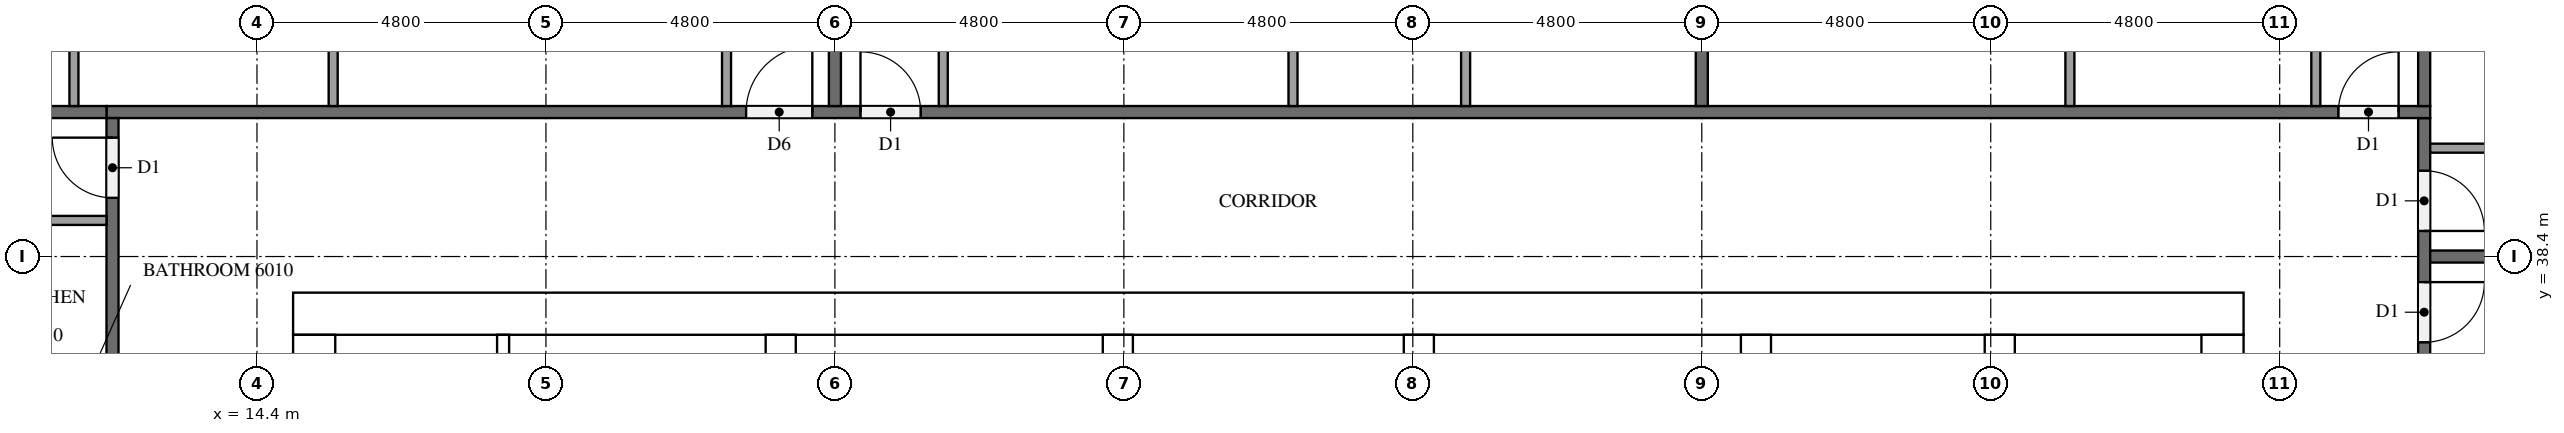
"""IFC4 building model, lengths in metres.
Left out: names, types, materials, properties, quantities, classifications, styles, units other than length and angle.
Written with IfcOpenShell. Run it as: python <this file> out.ifc"""

import sys

from ifc_helpers import new_model, si_unit, direction, frame, frame_2d, origin, place, context, subcontext, project, spatial, rectangle, extrude, element, fill, save


model = new_model("IFC4")
c1 = context("Model", 3, precision=1e-05, world=origin(), true_north=direction((0.0, 1.0)))
c2 = subcontext(c1, "Body", "Model", "MODEL_VIEW")
j1 = project(units=[si_unit("LENGTHUNIT", "METRE"), si_unit("PLANEANGLEUNIT", "RADIAN")], contexts=[c1])
p1 = place(None, origin())
s1 = spatial("IfcSite", under=j1, at=p1, CompositionType="ELEMENT")
p2 = place(p1, origin())
s2 = spatial("IfcBuilding", under=s1, at=p2, CompositionType="ELEMENT")
p3 = place(p2, frame((0.0, 0.0, 229.8)))
s3 = spatial("IfcBuildingStorey", under=s2, at=p3, CompositionType="ELEMENT", Elevation=229.8)
p4 = place(p3, frame((15.0, 37.45, 0.0), z_axis=(0.0, 0.0, 1.0), x_axis=(1.0, 0.0, 0.0)))
e1 = element("IfcWall", 1, at=p4, inside=s3, PredefinedType="SHEAR", context=c2, shape_type="SweptSolid", body=[
    extrude(rectangle(XDim=32.4, YDim=0.7, at=frame_2d((16.2, 0.0))), origin(), (0.0, 0.0, 1.0), 3.1),
])
p5 = place(p4, frame((15.3, 0.0, 0.0)))
e2 = element("IfcOpeningElement", 2, at=p5, cuts=e1, PredefinedType="OPENING", context=c2, shape_type="SweptSolid", body=[
    extrude(rectangle(XDim=1.8, YDim=2.1, at=frame_2d((0.9, 1.05))), frame((0.0, 0.36, 0.0), z_axis=(0.0, -1.0, 0.0), x_axis=(1.0, 0.0, 0.0)), (0.0, 0.0, 1.0), 0.72),
])
p6 = place(p4, frame((1.544, 0.0, 0.0)))
e3 = element("IfcOpeningElement", 3, at=p6, cuts=e1, PredefinedType="OPENING", context=c2, shape_type="SweptSolid", body=[
    extrude(rectangle(XDim=1.0, YDim=2.1, at=frame_2d((0.5, 1.05))), frame((0.0, 0.36, 0.0), z_axis=(0.0, -1.0, 0.0), x_axis=(1.0, 0.0, 0.0)), (0.0, 0.0, 1.0), 0.72),
])
p7 = place(p4, frame((5.219, 0.0, 0.0)))
e4 = element("IfcOpeningElement", 4, at=p7, cuts=e1, PredefinedType="OPENING", context=c2, shape_type="SweptSolid", body=[
    extrude(rectangle(XDim=1.0, YDim=2.1, at=frame_2d((0.5, 1.05))), frame((0.0, 0.36, 0.0), z_axis=(0.0, -1.0, 0.0), x_axis=(1.0, 0.0, 0.0)), (0.0, 0.0, 1.0), 0.72),
])
p8 = place(p3, frame((15.35, 15.7, 0.0), z_axis=(0.0, 0.0, 1.0), x_axis=(0.0, 1.0, 0.0)))
e5 = element("IfcWall", 5, at=p8, inside=s3, PredefinedType="SHEAR", context=c2, shape_type="SweptSolid", body=[
    extrude(rectangle(XDim=21.4, YDim=0.7, at=frame_2d((10.7, 0.0))), origin(), (0.0, 0.0, 1.0), 3.1),
])
p9 = place(p8, frame((5.06, 0.0, 0.0)))
e6 = element("IfcOpeningElement", 6, at=p9, cuts=e5, PredefinedType="OPENING", context=c2, shape_type="SweptSolid", body=[
    extrude(rectangle(XDim=1.2, YDim=2.1, at=frame_2d((0.6, 1.05))), frame((0.0, 0.36, 0.0), z_axis=(0.0, -1.0, 0.0), x_axis=(1.0, 0.0, 0.0)), (0.0, 0.0, 1.0), 0.72),
])
p10 = place(p3, frame((47.05, 15.7, 0.0), z_axis=(0.0, 0.0, 1.0), x_axis=(0.0, 1.0, 0.0)))
e7 = element("IfcWall", 7, at=p10, inside=s3, PredefinedType="SHEAR", context=c2, shape_type="SweptSolid", body=[
    extrude(rectangle(XDim=21.4, YDim=0.7, at=frame_2d((10.7, 0.0))), origin(), (0.0, 0.0, 1.0), 3.1),
])
p11 = place(p10, frame((10.4, 0.0, 0.0)))
e8 = element("IfcOpeningElement", 8, at=p11, cuts=e7, PredefinedType="OPENING", context=c2, shape_type="SweptSolid", body=[
    extrude(rectangle(XDim=1.2, YDim=2.1, at=frame_2d((0.6, 1.05))), frame((0.0, 0.36, 0.0), z_axis=(0.0, -1.0, 0.0), x_axis=(1.0, 0.0, 0.0)), (0.0, 0.0, 1.0), 0.72),
])
p12 = place(p3, frame((23.1, 15.7, 0.0), z_axis=(0.0, 0.0, 1.0), x_axis=(0.0, 1.0, 0.0)))
e9 = element("IfcWall", 9, at=p12, inside=s3, PredefinedType="SHEAR", context=c2, shape_type="SweptSolid", body=[
    extrude(rectangle(XDim=21.4, YDim=0.5, at=frame_2d((10.7, 0.0))), origin(), (0.0, 0.0, 1.0), 3.1),
])
p13 = place(p3, frame((39.3, 27.75, 0.0), z_axis=(0.0, 0.0, 1.0), x_axis=(0.0, 1.0, 0.0)))
e10 = element("IfcWall", 10, at=p13, inside=s3, PredefinedType="SHEAR", context=c2, shape_type="SweptSolid", body=[
    extrude(rectangle(XDim=9.35, YDim=0.5, at=frame_2d((4.675, 0.0))), origin(), (0.0, 0.0, 1.0), 3.1),
])
p14 = place(p3, frame((43.35, 27.75, 0.0), z_axis=(0.0, 0.0, 1.0), x_axis=(0.0, 1.0, 0.0)))
e11 = element("IfcWall", 11, at=p14, inside=s3, PredefinedType="SHEAR", context=c2, shape_type="SweptSolid", body=[
    extrude(rectangle(XDim=9.35, YDim=0.5, at=frame_2d((4.675, 0.0))), origin(), (0.0, 0.0, 1.0), 3.1),
])
p15 = place(p14, frame((7.65, 0.0, 0.0)))
e12 = element("IfcOpeningElement", 12, at=p15, cuts=e11, PredefinedType="OPENING", context=c2, shape_type="SweptSolid", body=[
    extrude(rectangle(XDim=1.2, YDim=2.1, at=frame_2d((0.6, 1.05))), frame((0.0, 0.26, 0.0), z_axis=(0.0, -1.0, 0.0), x_axis=(1.0, 0.0, 0.0)), (0.0, 0.0, 1.0), 0.52),
])
for number, where, z_axis, x_axis in (
    (13, (28.7, 33.8, 0.0), (0.0, 0.0, 1.0), (0.0, 1.0, 0.0)),
    (14, (33.7, 33.8, 0.0), (0.0, 0.0, 1.0), (0.0, 1.0, 0.0)),
):
    element("IfcWall", number, at=place(p3, frame(where, z_axis=z_axis, x_axis=x_axis)), inside=s3, PredefinedType="SHEAR", context=c2, shape_type="SweptSolid", body=[
        extrude(rectangle(XDim=3.3, YDim=0.5, at=frame_2d((1.65, 0.0))), origin(), (0.0, 0.0, 1.0), 3.1),
    ])
p16 = place(p3, frame((18.489, 31.5, 0.0), z_axis=(0.0, 0.0, 1.0), x_axis=(0.0, 1.0, 0.0)))
e15 = element("IfcWall", 15, at=p16, inside=s3, PredefinedType="PARTITIONING", context=c2, shape_type="SweptSolid", body=[
    extrude(rectangle(XDim=5.6, YDim=0.2, at=frame_2d((2.8, 0.0))), origin(), (0.0, 0.0, 1.0), 3.1),
])
p17 = place(p3, frame((50.4, 40.7, 0.0), z_axis=(0.0, 0.0, 1.0), x_axis=(0.0, -1.0, 0.0)))
e16 = element("IfcWall", 16, at=p17, inside=s3, PredefinedType="PARTITIONING", context=c2, shape_type="SweptSolid", body=[
    extrude(rectangle(XDim=28.6, YDim=0.2, at=frame_2d((14.3, 0.0))), origin(), (0.0, 0.0, 1.0), 3.1),
])
p18 = place(p17, frame((27.275, 0.0, 0.0)))
e17 = element("IfcOpeningElement", 17, at=p18, cuts=e16, PredefinedType="OPENING", context=c2, shape_type="SweptSolid", body=[
    extrude(rectangle(XDim=1.0, YDim=2.1, at=frame_2d((0.5, 1.05))), frame((0.0, 0.11, 0.0), z_axis=(0.0, -1.0, 0.0), x_axis=(1.0, 0.0, 0.0)), (0.0, 0.0, 1.0), 0.22),
])
p19 = place(p17, frame((2.725, 0.0, 0.0)))
e18 = element("IfcOpeningElement", 18, at=p19, cuts=e16, PredefinedType="OPENING", context=c2, shape_type="SweptSolid", body=[
    extrude(rectangle(XDim=1.0, YDim=2.1, at=frame_2d((0.5, 1.05))), frame((0.0, 0.11, 0.0), z_axis=(0.0, -1.0, 0.0), x_axis=(1.0, 0.0, 0.0)), (0.0, 0.0, 1.0), 0.22),
])
p20 = place(p17, frame((0.875, 0.0, 0.0)))
e19 = element("IfcOpeningElement", 19, at=p20, cuts=e16, PredefinedType="OPENING", context=c2, shape_type="SweptSolid", body=[
    extrude(rectangle(XDim=1.0, YDim=2.1, at=frame_2d((0.5, 1.05))), frame((0.0, 0.11, 0.0), z_axis=(0.0, -1.0, 0.0), x_axis=(1.0, 0.0, 0.0)), (0.0, 0.0, 1.0), 0.22),
])
p21 = place(p3, frame((11.9, 40.8, 0.0), z_axis=(0.0, 0.0, 1.0), x_axis=(1.0, 0.0, 0.0)))
e20 = element("IfcWall", 20, at=p21, inside=s3, PredefinedType="PARTITIONING", context=c2, shape_type="SweptSolid", body=[
    extrude(rectangle(XDim=38.6, YDim=0.2, at=frame_2d((19.3, 0.0))), origin(), (0.0, 0.0, 1.0), 3.1),
])
p22 = place(p21, frame((37.075, 0.0, 0.0)))
e21 = element("IfcOpeningElement", 21, at=p22, cuts=e20, PredefinedType="OPENING", context=c2, shape_type="SweptSolid", body=[
    extrude(rectangle(XDim=1.0, YDim=2.1, at=frame_2d((0.5, 1.05))), frame((0.0, 0.11, 0.0), z_axis=(0.0, -1.0, 0.0), x_axis=(1.0, 0.0, 0.0)), (0.0, 0.0, 1.0), 0.22),
])
p23 = place(p21, frame((12.525, 0.0, 0.0)))
e22 = element("IfcOpeningElement", 22, at=p23, cuts=e20, PredefinedType="OPENING", context=c2, shape_type="SweptSolid", body=[
    extrude(rectangle(XDim=1.0, YDim=2.1, at=frame_2d((0.5, 1.05))), frame((0.0, 0.11, 0.0), z_axis=(0.0, -1.0, 0.0), x_axis=(1.0, 0.0, 0.0)), (0.0, 0.0, 1.0), 0.22),
])
p24 = place(p21, frame((10.625, 0.0, 0.0)))
e23 = element("IfcOpeningElement", 23, at=p24, cuts=e20, PredefinedType="OPENING", context=c2, shape_type="SweptSolid", body=[
    extrude(rectangle(XDim=1.1, YDim=2.1, at=frame_2d((0.55, 1.05))), frame((0.0, 0.11, 0.0), z_axis=(0.0, -1.0, 0.0), x_axis=(1.0, 0.0, 0.0)), (0.0, 0.0, 1.0), 0.22),
])
p25 = place(p3, frame((12.0, 12.1, 0.0), z_axis=(0.0, 0.0, 1.0), x_axis=(0.0, 1.0, 0.0)))
e24 = element("IfcWall", 24, at=p25, inside=s3, PredefinedType="PARTITIONING", context=c2, shape_type="SweptSolid", body=[
    extrude(rectangle(XDim=28.6, YDim=0.2, at=frame_2d((14.3, 0.0))), origin(), (0.0, 0.0, 1.0), 3.1),
])
p26 = place(p25, frame((27.275, 0.0, 0.0)))
e25 = element("IfcOpeningElement", 25, at=p26, cuts=e24, PredefinedType="OPENING", context=c2, shape_type="SweptSolid", body=[
    extrude(rectangle(XDim=1.0, YDim=2.1, at=frame_2d((0.5, 1.05))), frame((0.0, 0.11, 0.0), z_axis=(0.0, -1.0, 0.0), x_axis=(1.0, 0.0, 0.0)), (0.0, 0.0, 1.0), 0.22),
])
p27 = place(p25, frame((20.075, 0.0, 0.0)))
e26 = element("IfcOpeningElement", 26, at=p27, cuts=e24, PredefinedType="OPENING", context=c2, shape_type="SweptSolid", body=[
    extrude(rectangle(XDim=1.0, YDim=2.1, at=frame_2d((0.5, 1.05))), frame((0.0, 0.11, 0.0), z_axis=(0.0, -1.0, 0.0), x_axis=(1.0, 0.0, 0.0)), (0.0, 0.0, 1.0), 0.22),
])
p28 = place(p25, frame((10.425, 0.0, 0.0)))
e27 = element("IfcOpeningElement", 27, at=p28, cuts=e24, PredefinedType="OPENING", context=c2, shape_type="SweptSolid", body=[
    extrude(rectangle(XDim=1.1, YDim=2.1, at=frame_2d((0.55, 1.05))), frame((0.0, 0.11, 0.0), z_axis=(0.0, -1.0, 0.0), x_axis=(1.0, 0.0, 0.0)), (0.0, 0.0, 1.0), 0.22),
])
p29 = place(p3, frame((50.5, 38.4, 0.0), z_axis=(0.0, 0.0, 1.0), x_axis=(1.0, 0.0, 0.0)))
e28 = element("IfcWall", 28, at=p29, inside=s3, PredefinedType="PARTITIONING", context=c2, shape_type="SweptSolid", body=[
    extrude(rectangle(XDim=11.575, YDim=0.2, at=frame_2d((5.788, 0.0))), origin(), (0.0, 0.0, 1.0), 3.1),
])
p30 = place(p3, frame((50.4, 40.9, 0.0), z_axis=(0.0, 0.0, 1.0), x_axis=(0.0, 1.0, 0.0)))
e29 = element("IfcWall", 29, at=p30, inside=s3, PredefinedType="PARTITIONING", context=c2, shape_type="SweptSolid", body=[
    extrude(rectangle(XDim=11.8, YDim=0.2, at=frame_2d((5.9, 0.0))), origin(), (0.0, 0.0, 1.0), 3.1),
])
p31 = place(p3, frame((38.4, 52.475, 0.0), z_axis=(0.0, 0.0, 1.0), x_axis=(0.0, -1.0, 0.0)))
e30 = element("IfcWall", 30, at=p31, inside=s3, PredefinedType="PARTITIONING", context=c2, shape_type="SweptSolid", body=[
    extrude(rectangle(XDim=11.575, YDim=0.2, at=frame_2d((5.788, 0.0))), origin(), (0.0, 0.0, 1.0), 3.1),
])
p32 = place(p3, frame((24.0, 52.7, 0.0), z_axis=(0.0, 0.0, 1.0), x_axis=(0.0, -1.0, 0.0)))
e31 = element("IfcWall", 31, at=p32, inside=s3, PredefinedType="PARTITIONING", context=c2, shape_type="SweptSolid", body=[
    extrude(rectangle(XDim=11.8, YDim=0.2, at=frame_2d((5.9, 0.0))), origin(), (0.0, 0.0, 1.0), 3.1),
])
p33 = place(p3, frame((4.9, 40.8, 0.0), z_axis=(0.0, 0.0, 1.0), x_axis=(1.0, 0.0, 0.0)))
e32 = element("IfcWall", 32, at=p33, inside=s3, PredefinedType="PARTITIONING", context=c2, shape_type="SweptSolid", body=[
    extrude(rectangle(XDim=7.0, YDim=0.2, at=frame_2d((3.5, 0.0))), origin(), (0.0, 0.0, 1.0), 3.1),
])
p34 = place(p3, frame((50.5, 40.2, 0.0), z_axis=(0.0, 0.0, 1.0), x_axis=(1.0, 0.0, 0.0)))
e33 = element("IfcWall", 33, at=p34, inside=s3, PredefinedType="PARTITIONING", context=c2, shape_type="SweptSolid", body=[
    extrude(rectangle(XDim=4.475, YDim=0.15, at=frame_2d((2.238, 0.0))), origin(), (0.0, 0.0, 1.0), 3.1),
])
p35 = place(p3, frame((44.515, 40.9, 0.0), z_axis=(0.0, 0.0, 1.0), x_axis=(0.0, 1.0, 0.0)))
e34 = element("IfcWall", 34, at=p35, inside=s3, PredefinedType="PARTITIONING", context=c2, shape_type="SweptSolid", body=[
    extrude(rectangle(XDim=3.125, YDim=0.15, at=frame_2d((1.562, 0.0))), origin(), (0.0, 0.0, 1.0), 3.1),
])
for number, where, z_axis, x_axis in (
    (35, (48.6, 40.9, 0.0), (0.0, 0.0, 1.0), (0.0, 1.0, 0.0)),
    (36, (31.61, 40.9, 0.0), (0.0, 0.0, 1.0), (0.0, 1.0, 0.0)),
    (37, (34.477, 40.9, 0.0), (0.0, 0.0, 1.0), (0.0, 1.0, 0.0)),
):
    element("IfcWall", number, at=place(p3, frame(where, z_axis=z_axis, x_axis=x_axis)), inside=s3, PredefinedType="PARTITIONING", context=c2, shape_type="SweptSolid", body=[
        extrude(rectangle(XDim=3.275, YDim=0.15, at=frame_2d((1.638, 0.0))), origin(), (0.0, 0.0, 1.0), 3.1),
    ])
p36 = place(p3, frame((25.8, 40.9, 0.0), z_axis=(0.0, 0.0, 1.0), x_axis=(0.0, 1.0, 0.0)))
e38 = element("IfcWall", 38, at=p36, inside=s3, PredefinedType="PARTITIONING", context=c2, shape_type="SweptSolid", body=[
    extrude(rectangle(XDim=3.425, YDim=0.15, at=frame_2d((1.712, 0.0))), origin(), (0.0, 0.0, 1.0), 3.1),
])
for number, where, z_axis, x_axis in (
    (39, (15.666, 40.9, 0.0), (0.0, 0.0, 1.0), (0.0, 1.0, 0.0)),
    (40, (11.359, 40.9, 0.0), (0.0, 0.0, 1.0), (0.0, 1.0, 0.0)),
):
    element("IfcWall", number, at=place(p3, frame(where, z_axis=z_axis, x_axis=x_axis)), inside=s3, PredefinedType="PARTITIONING", context=c2, shape_type="SweptSolid", body=[
        extrude(rectangle(XDim=3.275, YDim=0.15, at=frame_2d((1.638, 0.0))), origin(), (0.0, 0.0, 1.0), 3.1),
    ])
p37 = place(p3, frame((22.2, 40.9, 0.0), z_axis=(0.0, 0.0, 1.0), x_axis=(0.0, 1.0, 0.0)))
e41 = element("IfcWall", 41, at=p37, inside=s3, PredefinedType="PARTITIONING", context=c2, shape_type="SweptSolid", body=[
    extrude(rectangle(XDim=3.425, YDim=0.15, at=frame_2d((1.712, 0.0))), origin(), (0.0, 0.0, 1.0), 3.1),
])
p38 = place(p3, frame((11.9, 39.0, 0.0), z_axis=(0.0, 0.0, 1.0), x_axis=(-1.0, 0.0, 0.0)))
e42 = element("IfcWall", 42, at=p38, inside=s3, PredefinedType="PARTITIONING", context=c2, shape_type="SweptSolid", body=[
    extrude(rectangle(XDim=2.225, YDim=0.15, at=frame_2d((1.112, 0.0))), origin(), (0.0, 0.0, 1.0), 3.1),
])
p39 = place(p5, origin())
e43 = element("IfcDoor", 43, at=p39, inside=s3, OperationType="DOUBLE_DOOR_SINGLE_SWING", PredefinedType="DOOR", context=c2, shape_type="SweptSolid", body=[
    extrude(rectangle(XDim=1.8, YDim=2.1, at=frame_2d((0.9, 1.05))), frame((0.0, 0.025, 0.0), z_axis=(0.0, -1.0, 0.0), x_axis=(1.0, 0.0, 0.0)), (0.0, 0.0, 1.0), 0.05),
])
fill(e2, e43)
p40 = place(p6, origin())
e44 = element("IfcDoor", 44, at=p40, inside=s3, OperationType="SINGLE_SWING_LEFT", PredefinedType="DOOR", context=c2, shape_type="SweptSolid", body=[
    extrude(rectangle(XDim=1.0, YDim=2.1, at=frame_2d((0.5, 1.05))), frame((0.0, 0.025, 0.0), z_axis=(0.0, -1.0, 0.0), x_axis=(1.0, 0.0, 0.0)), (0.0, 0.0, 1.0), 0.05),
])
fill(e3, e44)
p41 = place(p7, origin())
e45 = element("IfcDoor", 45, at=p41, inside=s3, OperationType="SINGLE_SWING_RIGHT", PredefinedType="DOOR", context=c2, shape_type="SweptSolid", body=[
    extrude(rectangle(XDim=1.0, YDim=2.1, at=frame_2d((0.5, 1.05))), frame((0.0, 0.025, 0.0), z_axis=(0.0, -1.0, 0.0), x_axis=(1.0, 0.0, 0.0)), (0.0, 0.0, 1.0), 0.05),
])
fill(e4, e45)
p42 = place(p19, origin())
e46 = element("IfcDoor", 46, at=p42, inside=s3, OperationType="SINGLE_SWING_LEFT", PredefinedType="DOOR", context=c2, shape_type="SweptSolid", body=[
    extrude(rectangle(XDim=1.0, YDim=2.1, at=frame_2d((0.5, 1.05))), frame((0.0, 0.025, 0.0), z_axis=(0.0, -1.0, 0.0), x_axis=(1.0, 0.0, 0.0)), (0.0, 0.0, 1.0), 0.05),
])
fill(e18, e46)
p43 = place(p20, origin())
e47 = element("IfcDoor", 47, at=p43, inside=s3, OperationType="SINGLE_SWING_RIGHT", PredefinedType="DOOR", context=c2, shape_type="SweptSolid", body=[
    extrude(rectangle(XDim=1.0, YDim=2.1, at=frame_2d((0.5, 1.05))), frame((0.0, 0.025, 0.0), z_axis=(0.0, -1.0, 0.0), x_axis=(1.0, 0.0, 0.0)), (0.0, 0.0, 1.0), 0.05),
])
fill(e19, e47)
p44 = place(p22, origin())
e48 = element("IfcDoor", 48, at=p44, inside=s3, OperationType="SINGLE_SWING_RIGHT", PredefinedType="DOOR", context=c2, shape_type="SweptSolid", body=[
    extrude(rectangle(XDim=1.0, YDim=2.1, at=frame_2d((0.5, 1.05))), frame((0.0, 0.025, 0.0), z_axis=(0.0, -1.0, 0.0), x_axis=(1.0, 0.0, 0.0)), (0.0, 0.0, 1.0), 0.05),
])
fill(e21, e48)
p45 = place(p23, origin())
e49 = element("IfcDoor", 49, at=p45, inside=s3, OperationType="SINGLE_SWING_LEFT", PredefinedType="DOOR", context=c2, shape_type="SweptSolid", body=[
    extrude(rectangle(XDim=1.0, YDim=2.1, at=frame_2d((0.5, 1.05))), frame((0.0, 0.025, 0.0), z_axis=(0.0, -1.0, 0.0), x_axis=(1.0, 0.0, 0.0)), (0.0, 0.0, 1.0), 0.05),
])
fill(e22, e49)
p46 = place(p24, origin())
e50 = element("IfcDoor", 50, at=p46, inside=s3, OperationType="SINGLE_SWING_RIGHT", PredefinedType="DOOR", context=c2, shape_type="SweptSolid", body=[
    extrude(rectangle(XDim=1.1, YDim=2.1, at=frame_2d((0.55, 1.05))), frame((0.0, 0.025, 0.0), z_axis=(0.0, -1.0, 0.0), x_axis=(1.0, 0.0, 0.0)), (0.0, 0.0, 1.0), 0.05),
])
fill(e23, e50)
p47 = place(p26, origin())
e51 = element("IfcDoor", 51, at=p47, inside=s3, OperationType="SINGLE_SWING_RIGHT", PredefinedType="DOOR", context=c2, shape_type="SweptSolid", body=[
    extrude(rectangle(XDim=1.0, YDim=2.1, at=frame_2d((0.5, 1.05))), frame((0.0, 0.025, 0.0), z_axis=(0.0, -1.0, 0.0), x_axis=(1.0, 0.0, 0.0)), (0.0, 0.0, 1.0), 0.05),
])
fill(e25, e51)
save(model, sys.argv[1])
